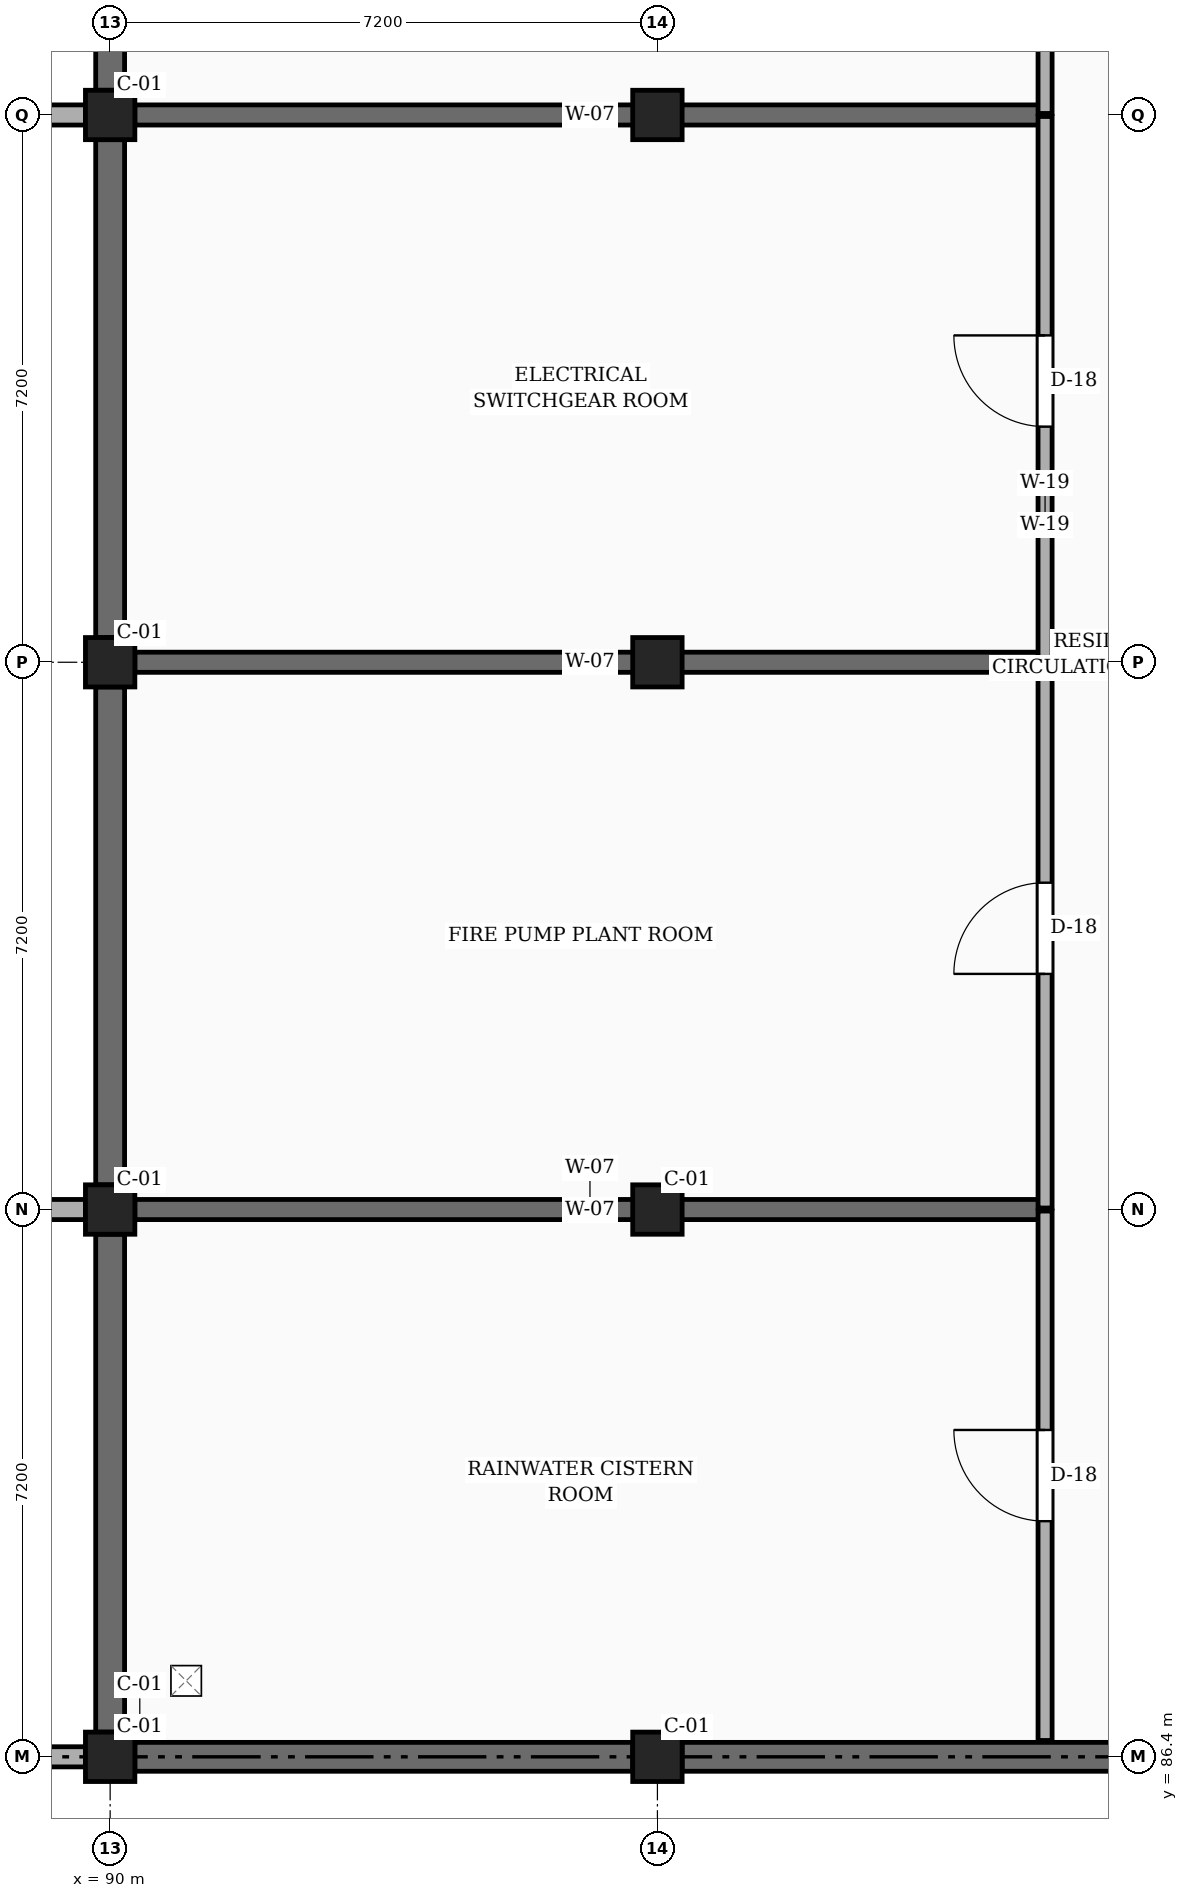
"""IFC4 building model, lengths in metres.
Left out: names, types, materials, properties, quantities, classifications, styles, units other than length and angle.
Written with IfcOpenShell. Run it as: python <this file> out.ifc"""

import sys

from ifc_helpers import new_model, si_unit, direction, frame, frame_2d, origin, origin_2d, place, context, subcontext, project, spatial, rectangle, extrude, element, fill, save


model = new_model("IFC4")
c1 = context("Model", 3, precision=1e-05, world=origin(), true_north=direction((0.0, 1.0)))
c2 = subcontext(c1, "Body", "Model", "MODEL_VIEW")
j1 = project(units=[si_unit("LENGTHUNIT", "METRE"), si_unit("PLANEANGLEUNIT", "RADIAN")], contexts=[c1])
p1 = place(None, origin())
s1 = spatial("IfcSite", under=j1, at=p1, CompositionType="ELEMENT")
p2 = place(p1, origin())
s2 = spatial("IfcBuilding", under=s1, at=p2, CompositionType="ELEMENT")
p3 = place(p2, frame((0.0, 0.0, -4.2)))
s3 = spatial("IfcBuildingStorey", under=s2, at=p3, CompositionType="ELEMENT", Elevation=-4.2)
p4 = place(p3, frame((87.81, 86.4, 0.0), z_axis=(0.0, 0.0, 1.0), x_axis=(1.0, 0.0, 0.0)))
e1 = element("IfcWall", 1, at=p4, inside=s3, PredefinedType="SOLIDWALL", context=c2, shape_type="SweptSolid", body=[
    extrude(rectangle(XDim=1.865, YDim=0.265, at=frame_2d((0.933, 0.0))), origin(), (0.0, 0.0, 1.0), 4.12),
])
for number, where, z_axis, x_axis in (
    (2, (89.675, 93.6, 0.0), (0.0, 0.0, 1.0), (-1.0, 0.0, 0.0)),
    (3, (87.81, 108.0, 0.0), (0.0, 0.0, 1.0), (1.0, 0.0, 0.0)),
):
    element("IfcWall", number, at=place(p3, frame(where, z_axis=z_axis, x_axis=x_axis)), inside=s3, PredefinedType="SOLIDWALL", context=c2, shape_type="SweptSolid", body=[
        extrude(rectangle(XDim=1.865, YDim=0.265, at=frame_2d((0.933, 0.0))), origin(), (0.0, 0.0, 1.0), 3.35),
    ])
for number, where, z_axis, x_axis in (
    (4, (90.0, 86.4, 0.0), (0.0, 0.0, 1.0), (1.0, 0.0, 0.0)),
    (5, (90.0, 93.6, 0.0), (0.0, 0.0, 1.0), (1.0, 0.0, 0.0)),
    (6, (90.0, 100.8, 0.0), (0.0, 0.0, 1.0), (1.0, 0.0, 0.0)),
    (7, (90.0, 108.0, 0.0), (0.0, 0.0, 1.0), (1.0, 0.0, 0.0)),
    (8, (97.2, 86.4, 0.0), (0.0, 0.0, 1.0), (1.0, 0.0, 0.0)),
    (9, (97.2, 93.6, 0.0), (0.0, 0.0, 1.0), (1.0, 0.0, 0.0)),
    (10, (97.2, 100.8, 0.0), (0.0, 0.0, 1.0), (1.0, 0.0, 0.0)),
    (11, (97.2, 108.0, 0.0), (0.0, 0.0, 1.0), (1.0, 0.0, 0.0)),
):
    element("IfcColumn", number, at=place(p3, frame(where, z_axis=z_axis, x_axis=x_axis)), inside=s3, PredefinedType="COLUMN", context=c2, shape_type="SweptSolid", body=[
        extrude(rectangle(XDim=0.65, YDim=0.65, at=origin_2d()), origin(), (0.0, 0.0, 1.0), 4.2),
    ])
for number, where, z_axis, x_axis in (
    (12, (90.325, 86.4, 0.0), (0.0, 0.0, 1.0), (1.0, 0.0, 0.0)),
    (13, (97.525, 86.4, 0.0), (0.0, 0.0, 1.0), (1.0, 0.0, 0.0)),
):
    element("IfcWall", number, at=place(p3, frame(where, z_axis=z_axis, x_axis=x_axis)), inside=s3, PredefinedType="USERDEFINED", context=c2, shape_type="SweptSolid", body=[
        extrude(rectangle(XDim=6.55, YDim=0.38, at=frame_2d((3.275, 0.0))), origin(), (0.0, 0.0, 1.0), 3.03),
    ])
p5 = place(p3, frame((90.0, 93.275, 0.0), z_axis=(0.0, 0.0, 1.0), x_axis=(0.0, -1.0, 0.0)))
e14 = element("IfcWall", 14, at=p5, inside=s3, PredefinedType="USERDEFINED", context=c2, shape_type="SweptSolid", body=[
    extrude(rectangle(XDim=6.55, YDim=0.38, at=frame_2d((3.275, 0.0))), origin(), (0.0, 0.0, 1.0), 3.03),
])
for number, where, z_axis, x_axis in (
    (15, (90.0, 100.475, 0.0), (0.0, 0.0, 1.0), (0.0, -1.0, 0.0)),
    (16, (90.0, 107.675, 0.0), (0.0, 0.0, 1.0), (0.0, -1.0, 0.0)),
    (17, (90.0, 114.875, 0.0), (0.0, 0.0, 1.0), (0.0, -1.0, 0.0)),
):
    element("IfcWall", number, at=place(p3, frame(where, z_axis=z_axis, x_axis=x_axis)), inside=s3, PredefinedType="USERDEFINED", context=c2, shape_type="SweptSolid", body=[
        extrude(rectangle(XDim=6.55, YDim=0.38, at=frame_2d((3.275, 0.0))), origin(), (0.0, 0.0, 1.0), 3.03),
    ])
for number, where, z_axis, x_axis in (
    (18, (90.325, 93.6, 0.0), (0.0, 0.0, 1.0), (1.0, 0.0, 0.0)),
    (19, (90.325, 100.8, 0.0), (0.0, 0.0, 1.0), (1.0, 0.0, 0.0)),
    (20, (90.325, 108.0, 0.0), (0.0, 0.0, 1.0), (1.0, 0.0, 0.0)),
):
    element("IfcWall", number, at=place(p3, frame(where, z_axis=z_axis, x_axis=x_axis)), inside=s3, PredefinedType="SOLIDWALL", context=c2, shape_type="SweptSolid", body=[
        extrude(rectangle(XDim=11.975, YDim=0.265, at=frame_2d((5.988, 0.0))), origin(), (0.0, 0.0, 1.0), 3.18),
    ])
p6 = place(p3, frame((102.3, 86.615, 0.0), z_axis=(0.0, 0.0, 1.0), x_axis=(0.0, 1.0, 0.0)))
e21 = element("IfcWall", 21, at=p6, inside=s3, PredefinedType="PARTITIONING", context=c2, shape_type="SweptSolid", body=[
    extrude(rectangle(XDim=6.965, YDim=0.185, at=frame_2d((3.482, 0.0))), origin(), (0.0, 0.0, 1.0), 3.315),
])
p7 = place(p6, frame((2.885, 0.0, 0.0)))
e22 = element("IfcOpeningElement", 22, at=p7, cuts=e21, PredefinedType="OPENING", context=c2, shape_type="SweptSolid", body=[
    extrude(rectangle(XDim=1.2, YDim=2.2, at=frame_2d((0.6, 1.1))), frame((0.0, 0.103, 0.0), z_axis=(0.0, -1.0, 0.0), x_axis=(1.0, 0.0, 0.0)), (0.0, 0.0, 1.0), 0.205),
])
p8 = place(p3, frame((102.3, 93.62, 0.0), z_axis=(0.0, 0.0, 1.0), x_axis=(0.0, 1.0, 0.0)))
e23 = element("IfcWall", 23, at=p8, inside=s3, PredefinedType="PARTITIONING", context=c2, shape_type="SweptSolid", body=[
    extrude(rectangle(XDim=7.16, YDim=0.185, at=frame_2d((3.58, 0.0))), origin(), (0.0, 0.0, 1.0), 3.315),
])
p9 = place(p8, frame((3.08, 0.0, 0.0)))
e24 = element("IfcOpeningElement", 24, at=p9, cuts=e23, PredefinedType="OPENING", context=c2, shape_type="SweptSolid", body=[
    extrude(rectangle(XDim=1.2, YDim=2.2, at=frame_2d((0.6, 1.1))), frame((0.0, 0.103, 0.0), z_axis=(0.0, -1.0, 0.0), x_axis=(1.0, 0.0, 0.0)), (0.0, 0.0, 1.0), 0.205),
])
p10 = place(p3, frame((102.3, 100.82, 0.0), z_axis=(0.0, 0.0, 1.0), x_axis=(0.0, 1.0, 0.0)))
e25 = element("IfcWall", 25, at=p10, inside=s3, PredefinedType="PARTITIONING", context=c2, shape_type="SweptSolid", body=[
    extrude(rectangle(XDim=7.16, YDim=0.185, at=frame_2d((3.58, 0.0))), origin(), (0.0, 0.0, 1.0), 3.315),
])
p11 = place(p10, frame((3.08, 0.0, 0.0)))
e26 = element("IfcOpeningElement", 26, at=p11, cuts=e25, PredefinedType="OPENING", context=c2, shape_type="SweptSolid", body=[
    extrude(rectangle(XDim=1.2, YDim=2.2, at=frame_2d((0.6, 1.1))), frame((0.0, 0.103, 0.0), z_axis=(0.0, -1.0, 0.0), x_axis=(1.0, 0.0, 0.0)), (0.0, 0.0, 1.0), 0.205),
])
p12 = place(p3, frame((102.3, 108.02, 0.0), z_axis=(0.0, 0.0, 1.0), x_axis=(0.0, 1.0, 0.0)))
e27 = element("IfcWall", 27, at=p12, inside=s3, PredefinedType="PARTITIONING", context=c2, shape_type="SweptSolid", body=[
    extrude(rectangle(XDim=7.16, YDim=0.185, at=frame_2d((3.58, 0.0))), origin(), (0.0, 0.0, 1.0), 3.315),
])
p13 = place(p12, frame((3.08, 0.0, 0.0)))
e28 = element("IfcOpeningElement", 28, at=p13, cuts=e27, PredefinedType="OPENING", context=c2, shape_type="SweptSolid", body=[
    extrude(rectangle(XDim=1.2, YDim=2.2, at=frame_2d((0.6, 1.1))), frame((0.0, 0.103, 0.0), z_axis=(0.0, -1.0, 0.0), x_axis=(1.0, 0.0, 0.0)), (0.0, 0.0, 1.0), 0.205),
])
p14 = place(p7, origin())
e29 = element("IfcDoor", 29, at=p14, inside=s3, OperationType="SINGLE_SWING_RIGHT", PredefinedType="DOOR", context=c2, shape_type="SweptSolid", body=[
    extrude(rectangle(XDim=1.2, YDim=2.2, at=frame_2d((0.6, 1.1))), frame((0.0, 0.025, 0.0), z_axis=(0.0, -1.0, 0.0), x_axis=(1.0, 0.0, 0.0)), (0.0, 0.0, 1.0), 0.05),
])
fill(e22, e29)
p15 = place(p9, origin())
e30 = element("IfcDoor", 30, at=p15, inside=s3, OperationType="SINGLE_SWING_LEFT", PredefinedType="DOOR", context=c2, shape_type="SweptSolid", body=[
    extrude(rectangle(XDim=1.2, YDim=2.2, at=frame_2d((0.6, 1.1))), frame((0.0, 0.025, 0.0), z_axis=(0.0, -1.0, 0.0), x_axis=(1.0, 0.0, 0.0)), (0.0, 0.0, 1.0), 0.05),
])
fill(e24, e30)
p16 = place(p11, origin())
e31 = element("IfcDoor", 31, at=p16, inside=s3, OperationType="SINGLE_SWING_RIGHT", PredefinedType="DOOR", context=c2, shape_type="SweptSolid", body=[
    extrude(rectangle(XDim=1.2, YDim=2.2, at=frame_2d((0.6, 1.1))), frame((0.0, 0.025, 0.0), z_axis=(0.0, -1.0, 0.0), x_axis=(1.0, 0.0, 0.0)), (0.0, 0.0, 1.0), 0.05),
])
fill(e26, e31)
save(model, sys.argv[1])
